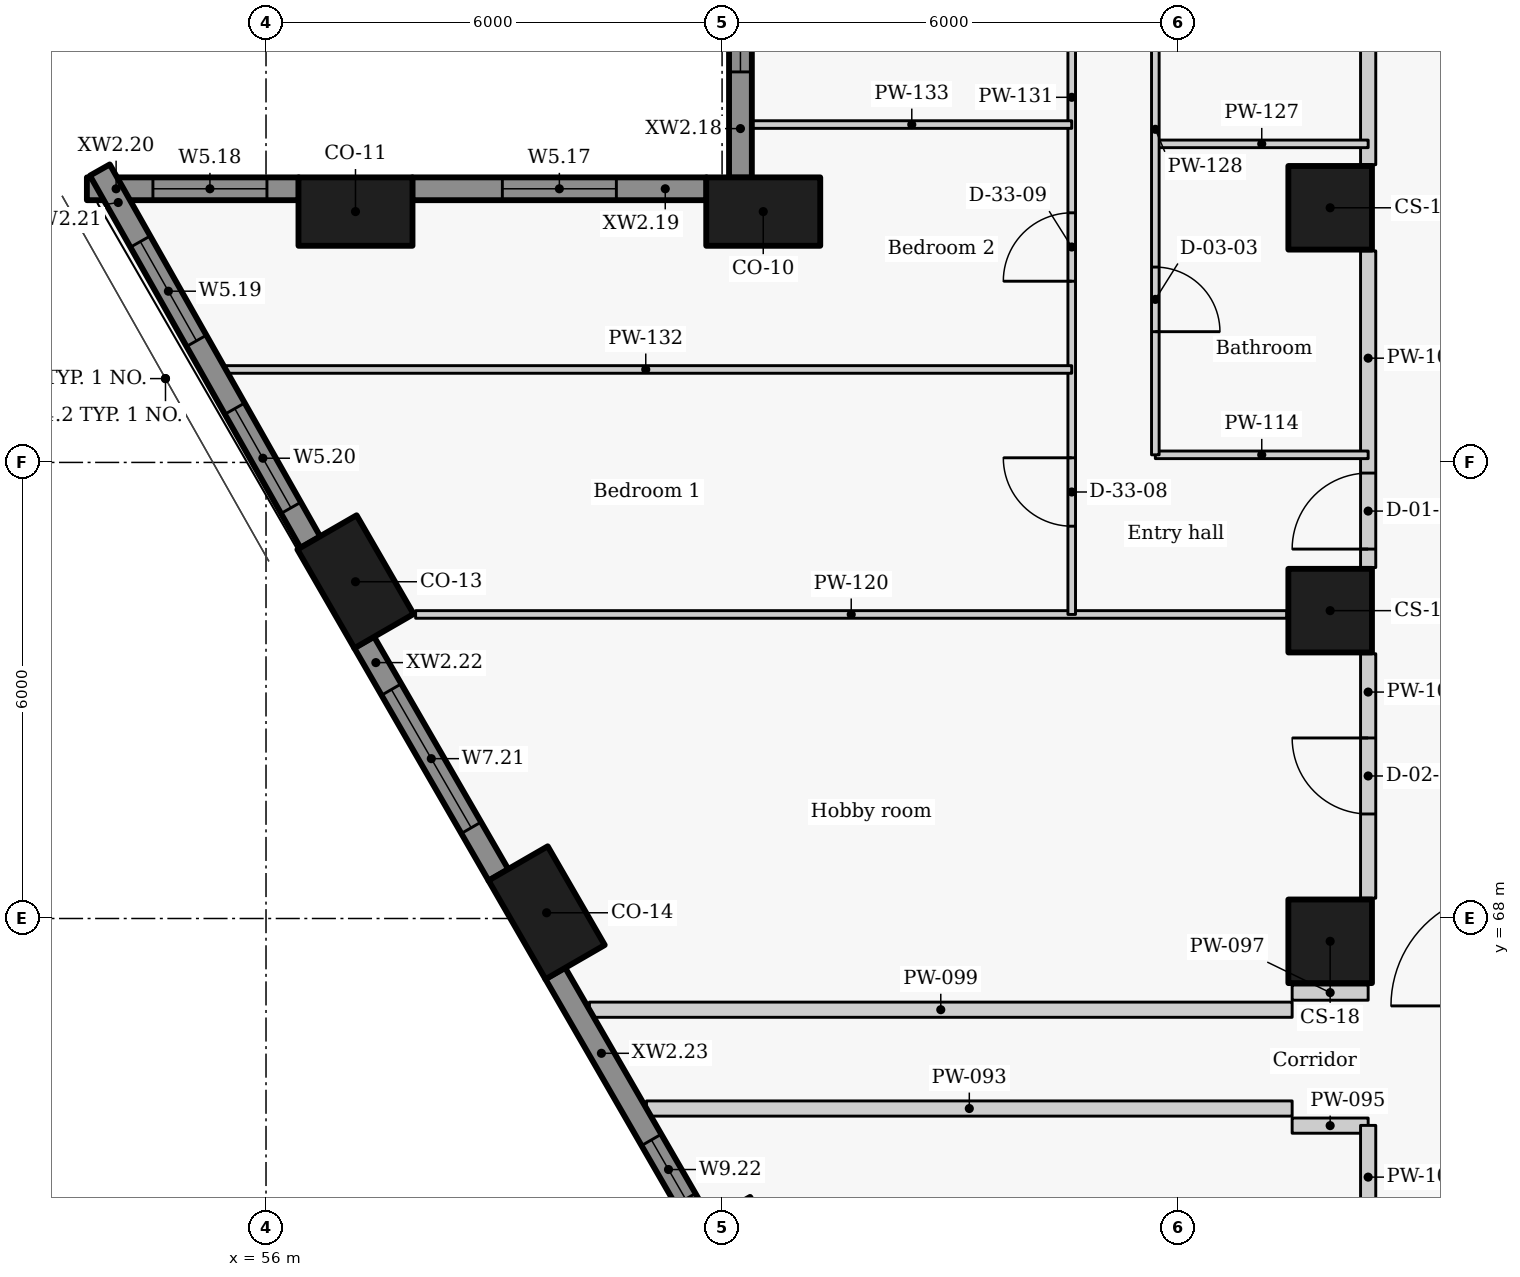
"""IFC4 building model, lengths in metres.
Left out: names, types, materials, properties, quantities, classifications, styles, units other than length and angle.
Written with IfcOpenShell. Run it as: python <this file> out.ifc"""

import sys

from ifc_helpers import new_model, si_unit, direction, frame, frame_2d, origin, origin_2d, place, context, subcontext, project, spatial, rectangle, extrude, element, fill, save


model = new_model("IFC4")
c1 = context("Model", 3, precision=1e-05, world=origin(), true_north=direction((0.0, 1.0)))
c2 = subcontext(c1, "Body", "Model", "MODEL_VIEW")
j1 = project(units=[si_unit("LENGTHUNIT", "METRE"), si_unit("PLANEANGLEUNIT", "RADIAN")], contexts=[c1])
p1 = place(None, origin())
s1 = spatial("IfcSite", under=j1, at=p1, CompositionType="ELEMENT")
p2 = place(p1, origin())
s2 = spatial("IfcBuilding", under=s1, at=p2, CompositionType="ELEMENT")
p3 = place(p2, frame((0.0, 0.0, 44.7)))
s3 = spatial("IfcBuildingStorey", under=s2, at=p3, CompositionType="ELEMENT", Elevation=44.7)
for number, where, z_axis, x_axis in (
    (1, (62.542, 77.3, 0.0), (0.0, 0.0, 1.0), (-1.0, 0.0, 0.0)),
    (2, (57.177, 77.3, 0.0), (0.0, 0.0, 1.0), (-1.0, 0.0, 0.0)),
    (3, (57.177, 72.43, 0.0), (0.0, 0.0, 1.0), (0.5, -0.866, 0.0)),
    (4, (59.692, 68.075, 0.0), (0.0, 0.0, 1.0), (0.5, -0.866, 0.0)),
    (5, (62.354, 63.463, 0.0), (0.0, 0.0, 1.0), (0.5, -0.866, 0.0)),
):
    element("IfcColumn", number, at=place(p3, frame(where, z_axis=z_axis, x_axis=x_axis)), inside=s3, PredefinedType="COLUMN", context=c2, shape_type="SweptSolid", body=[
        extrude(rectangle(XDim=1.5, YDim=0.9, at=origin_2d()), origin(), (0.0, 0.0, 1.0), 3.3),
    ])
for number, where, z_axis, x_axis in (
    (6, (70.0, 77.35, 0.0), (0.0, 0.0, 1.0), (0.0, -1.0, 0.0)),
    (7, (70.0, 72.05, 0.0), (0.0, 0.0, 1.0), (0.0, -1.0, 0.0)),
    (8, (70.0, 67.7, 0.0), (0.0, 0.0, 1.0), (0.0, -1.0, 0.0)),
):
    element("IfcColumn", number, at=place(p3, frame(where, z_axis=z_axis, x_axis=x_axis)), inside=s3, PredefinedType="COLUMN", context=c2, shape_type="SweptSolid", body=[
        extrude(rectangle(XDim=1.1, YDim=1.1, at=origin_2d()), origin(), (0.0, 0.0, 1.0), 3.3),
    ])
p4 = place(p3, frame((62.242, 81.954, 0.0), z_axis=(0.0, 0.0, 1.0), x_axis=(0.0, -1.0, 0.0)))
e9 = element("IfcWall", 9, at=p4, inside=s3, PredefinedType="SOLIDWALL", context=c2, shape_type="SweptSolid", body=[
    extrude(rectangle(XDim=4.208, YDim=0.3, at=frame_2d((2.104, 0.0))), origin(), (0.0, 0.0, 1.0), 2.425),
])
p5 = place(p4, frame((0.716, 0.0, 0.9)))
e10 = element("IfcOpeningElement", 10, at=p5, cuts=e9, PredefinedType="OPENING", context=c2, shape_type="SweptSolid", body=[
    extrude(rectangle(XDim=2.1, YDim=1.1, at=frame_2d((1.05, 0.55))), frame((0.0, 0.16, 0.0), z_axis=(0.0, -1.0, 0.0), x_axis=(1.0, 0.0, 0.0)), (0.0, 0.0, 1.0), 0.32),
])
p6 = place(p3, frame((61.796, 77.6, 0.0), z_axis=(0.0, 0.0, 1.0), x_axis=(-1.0, 0.0, 0.0)))
e11 = element("IfcWall", 11, at=p6, inside=s3, PredefinedType="SOLIDWALL", context=c2, shape_type="SweptSolid", body=[
    extrude(rectangle(XDim=3.873, YDim=0.3, at=frame_2d((1.936, 0.0))), origin(), (0.0, 0.0, 1.0), 2.425),
])
p7 = place(p6, frame((1.186, 0.0, 0.9)))
e12 = element("IfcOpeningElement", 12, at=p7, cuts=e11, PredefinedType="OPENING", context=c2, shape_type="SweptSolid", body=[
    extrude(rectangle(XDim=1.5, YDim=1.1, at=frame_2d((0.75, 0.55))), frame((0.0, 0.16, 0.0), z_axis=(0.0, -1.0, 0.0), x_axis=(1.0, 0.0, 0.0)), (0.0, 0.0, 1.0), 0.32),
])
p8 = place(p3, frame((56.431, 77.6, 0.0), z_axis=(0.0, 0.0, 1.0), x_axis=(-1.0, 0.0, 0.0)))
e13 = element("IfcWall", 13, at=p8, inside=s3, PredefinedType="SOLIDWALL", context=c2, shape_type="SweptSolid", body=[
    extrude(rectangle(XDim=2.788, YDim=0.3, at=frame_2d((1.394, 0.0))), origin(), (0.0, 0.0, 1.0), 2.425),
])
p9 = place(p8, frame((0.419, 0.0, 0.9)))
e14 = element("IfcOpeningElement", 14, at=p9, cuts=e13, PredefinedType="OPENING", context=c2, shape_type="SweptSolid", body=[
    extrude(rectangle(XDim=1.5, YDim=1.1, at=frame_2d((0.75, 0.55))), frame((0.0, 0.16, 0.0), z_axis=(0.0, -1.0, 0.0), x_axis=(1.0, 0.0, 0.0)), (0.0, 0.0, 1.0), 0.32),
])
p10 = place(p3, frame((53.814, 77.847, 0.0), z_axis=(0.0, 0.0, 1.0), x_axis=(0.492363204642, -0.870389840655, 0.0)))
e15 = element("IfcWall", 15, at=p10, inside=s3, PredefinedType="SOLIDWALL", context=c2, shape_type="SweptSolid", body=[
    extrude(rectangle(XDim=5.626, YDim=0.3, at=frame_2d((2.813, 0.0))), origin(), (0.0, 0.0, 1.0), 2.425),
])
p11 = place(p10, frame((1.081, 0.0, 0.9)))
e16 = element("IfcOpeningElement", 16, at=p11, cuts=e15, PredefinedType="OPENING", context=c2, shape_type="SweptSolid", body=[
    extrude(rectangle(XDim=1.5, YDim=1.1, at=frame_2d((0.75, 0.55))), frame((0.0, 0.16, 0.0), z_axis=(0.0, -1.0, 0.0), x_axis=(1.0, 0.0, 0.0)), (0.0, 0.0, 1.0), 0.32),
])
p12 = place(p10, frame((3.606, 0.0, 0.9)))
e17 = element("IfcOpeningElement", 17, at=p12, cuts=e15, PredefinedType="OPENING", context=c2, shape_type="SweptSolid", body=[
    extrude(rectangle(XDim=1.5, YDim=1.1, at=frame_2d((0.75, 0.55))), frame((0.0, 0.16, 0.0), z_axis=(0.0, -1.0, 0.0), x_axis=(1.0, 0.0, 0.0)), (0.0, 0.0, 1.0), 0.32),
])
p13 = place(p3, frame((57.29, 71.634, 0.0), z_axis=(0.0, 0.0, 1.0), x_axis=(0.499977402622, -0.866038449993, 0.0)))
e18 = element("IfcWall", 18, at=p13, inside=s3, PredefinedType="SOLIDWALL", context=c2, shape_type="SweptSolid", body=[
    extrude(rectangle(XDim=3.537, YDim=0.3, at=frame_2d((1.769, 0.0))), origin(), (0.0, 0.0, 1.0), 2.425),
])
p14 = place(p13, frame((0.719, 0.0, 0.9)))
e19 = element("IfcOpeningElement", 19, at=p14, cuts=e18, PredefinedType="OPENING", context=c2, shape_type="SweptSolid", body=[
    extrude(rectangle(XDim=2.1, YDim=1.1, at=frame_2d((1.05, 0.55))), frame((0.0, 0.16, 0.0), z_axis=(0.0, -1.0, 0.0), x_axis=(1.0, 0.0, 0.0)), (0.0, 0.0, 1.0), 0.32),
])
p15 = place(p3, frame((59.805, 67.279, 0.0), z_axis=(0.0, 0.0, 1.0), x_axis=(0.500001735503, -0.866024401789, 0.0)))
e20 = element("IfcWall", 20, at=p15, inside=s3, PredefinedType="SOLIDWALL", context=c2, shape_type="SweptSolid", body=[
    extrude(rectangle(XDim=3.834, YDim=0.3, at=frame_2d((1.917, 0.0))), origin(), (0.0, 0.0, 1.0), 2.425),
])
p16 = place(p15, frame((2.531, 0.0, 0.9)))
e21 = element("IfcOpeningElement", 21, at=p16, cuts=e20, PredefinedType="OPENING", context=c2, shape_type="SweptSolid", body=[
    extrude(rectangle(XDim=0.9, YDim=1.1, at=frame_2d((0.45, 0.55))), frame((0.0, 0.16, 0.0), z_axis=(0.0, -1.0, 0.0), x_axis=(1.0, 0.0, 0.0)), (0.0, 0.0, 1.0), 0.32),
])
p17 = place(p3, frame((61.005, 65.5, 0.0), z_axis=(0.0, 0.0, 1.0), x_axis=(1.0, 0.0, 0.0)))
e22 = element("IfcWall", 22, at=p17, inside=s3, PredefinedType="PARTITIONING", context=c2, shape_type="SweptSolid", body=[
    extrude(rectangle(XDim=8.495, YDim=0.2, at=frame_2d((4.248, 0.0))), origin(), (0.0, 0.0, 1.0), 2.405),
])
for number, where, z_axis, x_axis in (
    (23, (69.5, 65.275, 0.0), (0.0, 0.0, 1.0), (1.0, 0.0, 0.0)),
    (24, (69.5, 67.025, 0.0), (0.0, 0.0, 1.0), (1.0, 0.0, 0.0)),
):
    element("IfcWall", number, at=place(p3, frame(where, z_axis=z_axis, x_axis=x_axis)), inside=s3, PredefinedType="PARTITIONING", context=c2, shape_type="SweptSolid", body=[
        extrude(rectangle(XDim=1.0, YDim=0.2, at=frame_2d((0.5, 0.0))), origin(), (0.0, 0.0, 1.0), 2.505),
    ])
p18 = place(p3, frame((60.255, 66.8, 0.0), z_axis=(0.0, 0.0, 1.0), x_axis=(1.0, 0.0, 0.0)))
e25 = element("IfcWall", 25, at=p18, inside=s3, PredefinedType="PARTITIONING", context=c2, shape_type="SweptSolid", body=[
    extrude(rectangle(XDim=9.245, YDim=0.2, at=frame_2d((4.623, 0.0))), origin(), (0.0, 0.0, 1.0), 2.405),
])
p19 = place(p3, frame((70.5, 63.917, 0.0), z_axis=(0.0, 0.0, 1.0), x_axis=(0.0, 1.0, 0.0)))
e26 = element("IfcWall", 26, at=p19, inside=s3, PredefinedType="PARTITIONING", context=c2, shape_type="SweptSolid", body=[
    extrude(rectangle(XDim=1.361, YDim=0.2, at=frame_2d((0.681, 0.0))), origin(), (0.0, 0.0, 1.0), 3.025),
])
p20 = place(p3, frame((70.5, 68.267, 0.0), z_axis=(0.0, 0.0, 1.0), x_axis=(0.0, 1.0, 0.0)))
e27 = element("IfcWall", 27, at=p20, inside=s3, PredefinedType="PARTITIONING", context=c2, shape_type="SweptSolid", body=[
    extrude(rectangle(XDim=3.216, YDim=0.2, at=frame_2d((1.608, 0.0))), origin(), (0.0, 0.0, 1.0), 3.025),
])
p21 = place(p20, frame((1.108, 0.0, 0.0)))
e28 = element("IfcOpeningElement", 28, at=p21, cuts=e27, PredefinedType="OPENING", context=c2, shape_type="SweptSolid", body=[
    extrude(rectangle(XDim=1.0, YDim=2.1, at=frame_2d((0.5, 1.05))), frame((0.0, 0.11, 0.0), z_axis=(0.0, -1.0, 0.0), x_axis=(1.0, 0.0, 0.0)), (0.0, 0.0, 1.0), 0.22),
])
p22 = place(p3, frame((70.5, 72.617, 0.0), z_axis=(0.0, 0.0, 1.0), x_axis=(0.0, 1.0, 0.0)))
e29 = element("IfcWall", 29, at=p22, inside=s3, PredefinedType="PARTITIONING", context=c2, shape_type="SweptSolid", body=[
    extrude(rectangle(XDim=4.166, YDim=0.2, at=frame_2d((2.083, 0.0))), origin(), (0.0, 0.0, 1.0), 3.025),
])
p23 = place(p22, frame((0.243, 0.0, 0.0)))
e30 = element("IfcOpeningElement", 30, at=p23, cuts=e29, PredefinedType="OPENING", context=c2, shape_type="SweptSolid", body=[
    extrude(rectangle(XDim=1.0, YDim=2.1, at=frame_2d((0.5, 1.05))), frame((0.0, 0.11, 0.0), z_axis=(0.0, -1.0, 0.0), x_axis=(1.0, 0.0, 0.0)), (0.0, 0.0, 1.0), 0.22),
])
p24 = place(p3, frame((70.5, 77.917, 0.0), z_axis=(0.0, 0.0, 1.0), x_axis=(0.0, 1.0, 0.0)))
e31 = element("IfcWall", 31, at=p24, inside=s3, PredefinedType="PARTITIONING", context=c2, shape_type="SweptSolid", body=[
    extrude(rectangle(XDim=4.166, YDim=0.2, at=frame_2d((2.083, 0.0))), origin(), (0.0, 0.0, 1.0), 3.025),
])
p25 = place(p3, frame((67.7, 74.1, 0.0), z_axis=(0.0, 0.0, 1.0), x_axis=(1.0, 0.0, 0.0)))
e32 = element("IfcWall", 32, at=p25, inside=s3, PredefinedType="PARTITIONING", context=c2, shape_type="SweptSolid", body=[
    extrude(rectangle(XDim=2.8, YDim=0.1, at=frame_2d((1.4, 0.0))), origin(), (0.0, 0.0, 1.0), 2.505),
])
p26 = place(p3, frame((57.968, 72.0, 0.0), z_axis=(0.0, 0.0, 1.0), x_axis=(1.0, 0.0, 0.0)))
e33 = element("IfcWall", 33, at=p26, inside=s3, PredefinedType="PARTITIONING", context=c2, shape_type="SweptSolid", body=[
    extrude(rectangle(XDim=11.462, YDim=0.1, at=frame_2d((5.731, 0.0))), origin(), (0.0, 0.0, 1.0), 3.025),
])
p27 = place(p3, frame((67.7, 78.191, 0.0), z_axis=(0.0, 0.0, 1.0), x_axis=(1.0, 0.0, 0.0)))
e34 = element("IfcWall", 34, at=p27, inside=s3, PredefinedType="PARTITIONING", context=c2, shape_type="SweptSolid", body=[
    extrude(rectangle(XDim=2.8, YDim=0.1, at=frame_2d((1.4, 0.0))), origin(), (0.0, 0.0, 1.0), 2.505),
])
p28 = place(p3, frame((67.7, 83.1, 0.0), z_axis=(0.0, 0.0, 1.0), x_axis=(0.0, -1.0, 0.0)))
e35 = element("IfcWall", 35, at=p28, inside=s3, PredefinedType="PARTITIONING", context=c2, shape_type="SweptSolid", body=[
    extrude(rectangle(XDim=9.0, YDim=0.1, at=frame_2d((4.5, 0.0))), origin(), (0.0, 0.0, 1.0), 3.025),
])
p29 = place(p28, frame((6.53, 0.0, 0.0)))
e36 = element("IfcOpeningElement", 36, at=p29, cuts=e35, PredefinedType="OPENING", context=c2, shape_type="SweptSolid", body=[
    extrude(rectangle(XDim=0.85, YDim=2.1, at=frame_2d((0.425, 1.05))), frame((0.0, 0.06, 0.0), z_axis=(0.0, -1.0, 0.0), x_axis=(1.0, 0.0, 0.0)), (0.0, 0.0, 1.0), 0.12),
])
p30 = place(p28, frame((2.005, 0.0, 0.0)))
e37 = element("IfcOpeningElement", 37, at=p30, cuts=e35, PredefinedType="OPENING", context=c2, shape_type="SweptSolid", body=[
    extrude(rectangle(XDim=0.9, YDim=2.1, at=frame_2d((0.45, 1.05))), frame((0.0, 0.06, 0.0), z_axis=(0.0, -1.0, 0.0), x_axis=(1.0, 0.0, 0.0)), (0.0, 0.0, 1.0), 0.12),
])
p31 = place(p3, frame((66.6, 72.0, 0.0), z_axis=(0.0, 0.0, 1.0), x_axis=(0.0, 1.0, 0.0)))
e38 = element("IfcWall", 38, at=p31, inside=s3, PredefinedType="PARTITIONING", context=c2, shape_type="SweptSolid", body=[
    extrude(rectangle(XDim=21.9, YDim=0.1, at=frame_2d((10.95, 0.0))), origin(), (0.0, 0.0, 1.0), 3.025),
])
p32 = place(p31, frame((1.161, 0.0, 0.0)))
e39 = element("IfcOpeningElement", 39, at=p32, cuts=e38, PredefinedType="OPENING", context=c2, shape_type="SweptSolid", body=[
    extrude(rectangle(XDim=0.9, YDim=2.1, at=frame_2d((0.45, 1.05))), frame((0.0, 0.06, 0.0), z_axis=(0.0, -1.0, 0.0), x_axis=(1.0, 0.0, 0.0)), (0.0, 0.0, 1.0), 0.12),
])
p33 = place(p31, frame((4.384, 0.0, 0.0)))
e40 = element("IfcOpeningElement", 40, at=p33, cuts=e38, PredefinedType="OPENING", context=c2, shape_type="SweptSolid", body=[
    extrude(rectangle(XDim=0.9, YDim=2.1, at=frame_2d((0.45, 1.05))), frame((0.0, 0.06, 0.0), z_axis=(0.0, -1.0, 0.0), x_axis=(1.0, 0.0, 0.0)), (0.0, 0.0, 1.0), 0.12),
])
p34 = place(p31, frame((8.323, 0.0, 0.0)))
e41 = element("IfcOpeningElement", 41, at=p34, cuts=e38, PredefinedType="OPENING", context=c2, shape_type="SweptSolid", body=[
    extrude(rectangle(XDim=0.9, YDim=2.1, at=frame_2d((0.45, 1.05))), frame((0.0, 0.06, 0.0), z_axis=(0.0, -1.0, 0.0), x_axis=(1.0, 0.0, 0.0)), (0.0, 0.0, 1.0), 0.12),
])
p35 = place(p31, frame((12.218, 0.0, 0.0)))
e42 = element("IfcOpeningElement", 42, at=p35, cuts=e38, PredefinedType="OPENING", context=c2, shape_type="SweptSolid", body=[
    extrude(rectangle(XDim=0.9, YDim=2.1, at=frame_2d((0.45, 1.05))), frame((0.0, 0.06, 0.0), z_axis=(0.0, -1.0, 0.0), x_axis=(1.0, 0.0, 0.0)), (0.0, 0.0, 1.0), 0.12),
])
p36 = place(p31, frame((15.353, 0.0, 0.0)))
e43 = element("IfcOpeningElement", 43, at=p36, cuts=e38, PredefinedType="OPENING", context=c2, shape_type="SweptSolid", body=[
    extrude(rectangle(XDim=0.9, YDim=2.1, at=frame_2d((0.45, 1.05))), frame((0.0, 0.06, 0.0), z_axis=(0.0, -1.0, 0.0), x_axis=(1.0, 0.0, 0.0)), (0.0, 0.0, 1.0), 0.12),
])
p37 = place(p31, frame((19.186, 0.0, 0.0)))
e44 = element("IfcOpeningElement", 44, at=p37, cuts=e38, PredefinedType="OPENING", context=c2, shape_type="SweptSolid", body=[
    extrude(rectangle(XDim=0.9, YDim=2.1, at=frame_2d((0.45, 1.05))), frame((0.0, 0.06, 0.0), z_axis=(0.0, -1.0, 0.0), x_axis=(1.0, 0.0, 0.0)), (0.0, 0.0, 1.0), 0.12),
])
p38 = place(p3, frame((55.392, 75.223, 0.0), z_axis=(0.0, 0.0, 1.0), x_axis=(1.0, 0.0, 0.0)))
e45 = element("IfcWall", 45, at=p38, inside=s3, PredefinedType="PARTITIONING", context=c2, shape_type="SweptSolid", body=[
    extrude(rectangle(XDim=11.208, YDim=0.1, at=frame_2d((5.604, 0.0))), origin(), (0.0, 0.0, 1.0), 2.405),
])
p39 = place(p3, frame((62.392, 78.445, 0.0), z_axis=(0.0, 0.0, 1.0), x_axis=(1.0, 0.0, 0.0)))
e46 = element("IfcWall", 46, at=p39, inside=s3, PredefinedType="PARTITIONING", context=c2, shape_type="SweptSolid", body=[
    extrude(rectangle(XDim=4.208, YDim=0.1, at=frame_2d((2.104, 0.0))), origin(), (0.0, 0.0, 1.0), 2.405),
])
p40 = place(p5, origin())
e47 = element("IfcWindow", 47, at=p40, inside=s3, PartitioningType="SINGLE_PANEL", PredefinedType="WINDOW", context=c2, shape_type="SweptSolid", body=[
    extrude(rectangle(XDim=2.1, YDim=1.1, at=frame_2d((1.05, 0.55))), frame((0.0, 0.03, 0.0), z_axis=(0.0, -1.0, 0.0), x_axis=(1.0, 0.0, 0.0)), (0.0, 0.0, 1.0), 0.06),
])
fill(e10, e47)
p41 = place(p7, origin())
e48 = element("IfcWindow", 48, at=p41, inside=s3, PartitioningType="SINGLE_PANEL", PredefinedType="WINDOW", context=c2, shape_type="SweptSolid", body=[
    extrude(rectangle(XDim=1.5, YDim=1.1, at=frame_2d((0.75, 0.55))), frame((0.0, 0.03, 0.0), z_axis=(0.0, -1.0, 0.0), x_axis=(1.0, 0.0, 0.0)), (0.0, 0.0, 1.0), 0.06),
])
fill(e12, e48)
p42 = place(p9, origin())
e49 = element("IfcWindow", 49, at=p42, inside=s3, PartitioningType="SINGLE_PANEL", PredefinedType="WINDOW", context=c2, shape_type="SweptSolid", body=[
    extrude(rectangle(XDim=1.5, YDim=1.1, at=frame_2d((0.75, 0.55))), frame((0.0, 0.03, 0.0), z_axis=(0.0, -1.0, 0.0), x_axis=(1.0, 0.0, 0.0)), (0.0, 0.0, 1.0), 0.06),
])
fill(e14, e49)
p43 = place(p11, origin())
e50 = element("IfcWindow", 50, at=p43, inside=s3, PartitioningType="SINGLE_PANEL", PredefinedType="WINDOW", context=c2, shape_type="SweptSolid", body=[
    extrude(rectangle(XDim=1.5, YDim=1.1, at=frame_2d((0.75, 0.55))), frame((0.0, 0.03, 0.0), z_axis=(0.0, -1.0, 0.0), x_axis=(1.0, 0.0, 0.0)), (0.0, 0.0, 1.0), 0.06),
])
fill(e16, e50)
p44 = place(p12, origin())
e51 = element("IfcWindow", 51, at=p44, inside=s3, PartitioningType="SINGLE_PANEL", PredefinedType="WINDOW", context=c2, shape_type="SweptSolid", body=[
    extrude(rectangle(XDim=1.5, YDim=1.1, at=frame_2d((0.75, 0.55))), frame((0.0, 0.03, 0.0), z_axis=(0.0, -1.0, 0.0), x_axis=(1.0, 0.0, 0.0)), (0.0, 0.0, 1.0), 0.06),
])
fill(e17, e51)
p45 = place(p14, origin())
e52 = element("IfcWindow", 52, at=p45, inside=s3, PartitioningType="SINGLE_PANEL", PredefinedType="WINDOW", context=c2, shape_type="SweptSolid", body=[
    extrude(rectangle(XDim=2.1, YDim=1.1, at=frame_2d((1.05, 0.55))), frame((0.0, 0.03, 0.0), z_axis=(0.0, -1.0, 0.0), x_axis=(1.0, 0.0, 0.0)), (0.0, 0.0, 1.0), 0.06),
])
fill(e19, e52)
p46 = place(p16, origin())
e53 = element("IfcWindow", 53, at=p46, inside=s3, PartitioningType="SINGLE_PANEL", PredefinedType="WINDOW", context=c2, shape_type="SweptSolid", body=[
    extrude(rectangle(XDim=0.9, YDim=1.1, at=frame_2d((0.45, 0.55))), frame((0.0, 0.03, 0.0), z_axis=(0.0, -1.0, 0.0), x_axis=(1.0, 0.0, 0.0)), (0.0, 0.0, 1.0), 0.06),
])
fill(e21, e53)
p47 = place(p23, origin())
e54 = element("IfcDoor", 54, at=p47, inside=s3, OperationType="SINGLE_SWING_LEFT", PredefinedType="DOOR", context=c2, shape_type="SweptSolid", body=[
    extrude(rectangle(XDim=1.0, YDim=2.1, at=frame_2d((0.5, 1.05))), frame((0.0, 0.025, 0.0), z_axis=(0.0, -1.0, 0.0), x_axis=(1.0, 0.0, 0.0)), (0.0, 0.0, 1.0), 0.05),
])
fill(e30, e54)
p48 = place(p29, origin())
e55 = element("IfcDoor", 55, at=p48, inside=s3, OperationType="SINGLE_SWING_RIGHT", PredefinedType="DOOR", context=c2, shape_type="SweptSolid", body=[
    extrude(rectangle(XDim=0.85, YDim=2.1, at=frame_2d((0.425, 1.05))), frame((0.0, 0.025, 0.0), z_axis=(0.0, -1.0, 0.0), x_axis=(1.0, 0.0, 0.0)), (0.0, 0.0, 1.0), 0.05),
])
fill(e36, e55)
p49 = place(p32, origin())
e56 = element("IfcDoor", 56, at=p49, inside=s3, OperationType="SINGLE_SWING_RIGHT", PredefinedType="DOOR", context=c2, shape_type="SweptSolid", body=[
    extrude(rectangle(XDim=0.9, YDim=2.1, at=frame_2d((0.45, 1.05))), frame((0.0, 0.025, 0.0), z_axis=(0.0, -1.0, 0.0), x_axis=(1.0, 0.0, 0.0)), (0.0, 0.0, 1.0), 0.05),
])
fill(e39, e56)
p50 = place(p33, origin())
e57 = element("IfcDoor", 57, at=p50, inside=s3, OperationType="SINGLE_SWING_LEFT", PredefinedType="DOOR", context=c2, shape_type="SweptSolid", body=[
    extrude(rectangle(XDim=0.9, YDim=2.1, at=frame_2d((0.45, 1.05))), frame((0.0, 0.025, 0.0), z_axis=(0.0, -1.0, 0.0), x_axis=(1.0, 0.0, 0.0)), (0.0, 0.0, 1.0), 0.05),
])
fill(e40, e57)
p51 = place(p21, origin())
e58 = element("IfcDoor", 58, at=p51, inside=s3, OperationType="SINGLE_SWING_RIGHT", PredefinedType="DOOR", context=c2, shape_type="SweptSolid", body=[
    extrude(rectangle(XDim=1.0, YDim=2.1, at=frame_2d((0.5, 1.05))), frame((0.0, 0.025, 0.0), z_axis=(0.0, -1.0, 0.0), x_axis=(1.0, 0.0, 0.0)), (0.0, 0.0, 1.0), 0.05),
])
fill(e28, e58)
save(model, sys.argv[1])
